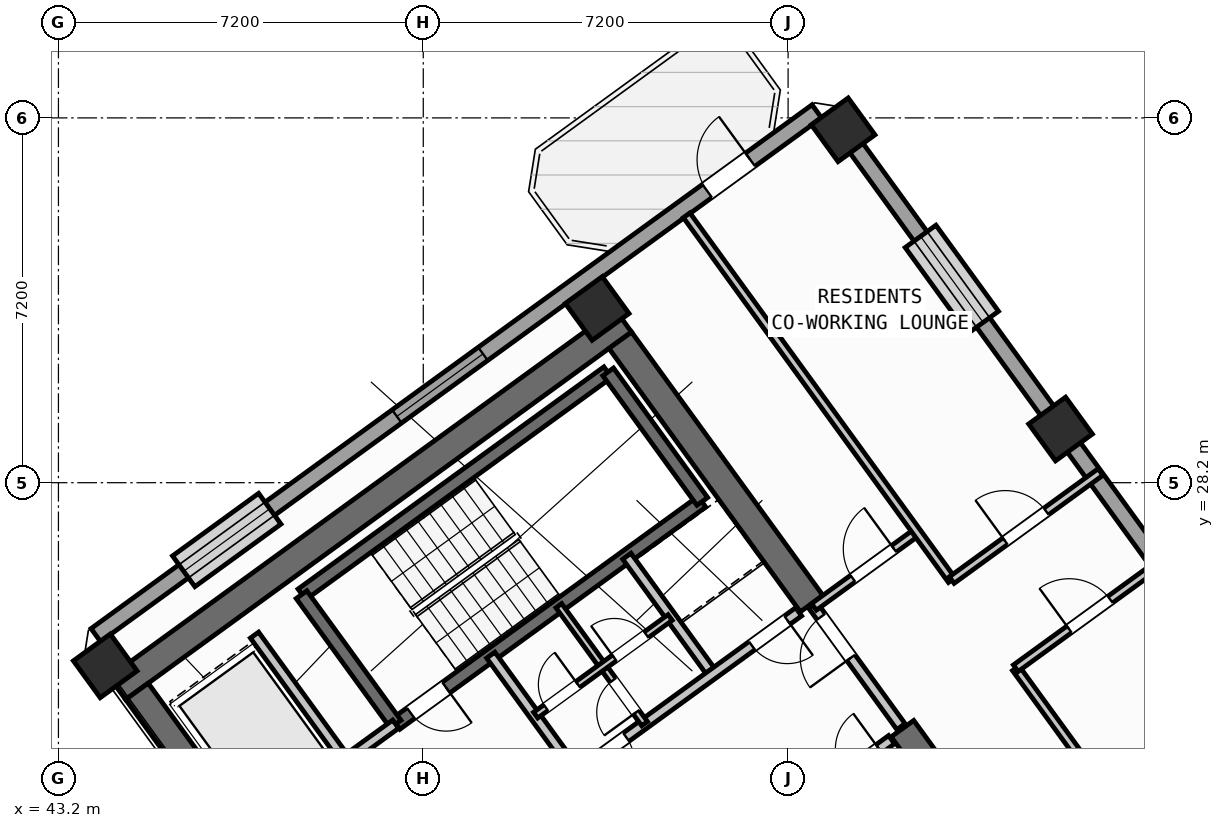
"""IFC4 building model, lengths in metres.
Left out: names, types, materials, properties, quantities, classifications, styles, units other than length and angle.
Written with IfcOpenShell. Run it as: python <this file> out.ifc"""

import sys

from ifc_helpers import new_model, si_unit, direction, frame, frame_2d, origin, origin_2d, place, context, subcontext, project, spatial, rectangle, hollow_rectangle, extrude, source, transform, mapped, element, fill, save


model = new_model("IFC4")
c1 = context("Model", 3, precision=1e-05, world=origin(), true_north=direction((0.0, 1.0)))
c2 = subcontext(c1, "Body", "Model", "MODEL_VIEW")
j1 = project(units=[si_unit("LENGTHUNIT", "METRE"), si_unit("PLANEANGLEUNIT", "RADIAN")], contexts=[c1])
p1 = place(None, origin())
s1 = spatial("IfcSite", under=j1, at=p1, CompositionType="ELEMENT")
p2 = place(p1, origin())
s2 = spatial("IfcBuilding", under=s1, at=p2, CompositionType="ELEMENT")
p3 = place(p2, frame((0.0, 0.0, 147.9)))
s3 = spatial("IfcBuildingStorey", under=s2, at=p3, CompositionType="ELEMENT", Elevation=147.9)
p4 = place(p3, frame((44.365, 24.142, 0.0), z_axis=(0.0, 0.0, 1.0), x_axis=(0.809024304885, 0.587775190107, 0.0)))
e1 = element("IfcWall", 1, at=p4, inside=s3, PredefinedType="SHEAR", context=c2, shape_type="SweptSolid", body=[
    extrude(rectangle(XDim=12.34, YDim=0.55, at=frame_2d((6.17, 0.0))), origin(), (0.0, 0.0, 1.0), 3.35),
])
p5 = place(p3, frame((48.526, 18.884, 0.0), z_axis=(0.0, 0.0, 1.0), x_axis=(-0.587764933797, 0.809031756236, 0.0)))
e2 = element("IfcWall", 2, at=p5, inside=s3, PredefinedType="SHEAR", context=c2, shape_type="SweptSolid", body=[
    extrude(rectangle(XDim=6.425, YDim=0.55, at=frame_2d((3.212, 0.0))), origin(), (0.0, 0.0, 1.0), 3.35),
])
p6 = place(p3, frame((61.958, 20.454, 0.0), z_axis=(0.0, 0.0, 1.0), x_axis=(-0.587802113096, 0.809004744015, 0.0)))
e3 = element("IfcWall", 3, at=p6, inside=s3, PredefinedType="SHEAR", context=c2, shape_type="SweptSolid", body=[
    extrude(rectangle(XDim=3.575, YDim=0.55, at=frame_2d((1.788, 0.0))), origin(), (0.0, 0.0, 1.0), 3.35),
])
p7 = place(p3, frame((58.064, 25.813, 0.0), z_axis=(0.0, 0.0, 1.0), x_axis=(-0.587764933797, 0.809031756236, 0.0)))
e4 = element("IfcWall", 4, at=p7, inside=s3, PredefinedType="SHEAR", context=c2, shape_type="SweptSolid", body=[
    extrude(rectangle(XDim=6.425, YDim=0.55, at=frame_2d((3.212, 0.0))), origin(), (0.0, 0.0, 1.0), 3.35),
])
m1 = source(origin(), c2, "Body", "SweptSolid", [
    extrude(hollow_rectangle(XDim=0.9, YDim=0.9, WallThickness=0.036, at=origin_2d()), origin(), (0.0, 0.0, 1.0), 3.6),
])
for number, where, z_axis, x_axis in (
    (5, (44.124, 24.585, 0.0), (0.0, 0.0, 1.0), (0.809, 0.588, 0.0)),
    (6, (53.832, 31.638, 0.0), (0.0, 0.0, 1.0), (0.809, 0.588, 0.0)),
    (7, (62.977, 29.259, 0.0), (0.0, 0.0, 1.0), (0.809, 0.588, 0.0)),
    (8, (58.686, 35.165, 0.0), (0.0, 0.0, 1.0), (0.809, 0.588, 0.0)),
):
    element("IfcColumn", number, at=place(p3, frame(where, z_axis=z_axis, x_axis=x_axis)), inside=s3, PredefinedType="COLUMN", context=c2, shape_type="MappedRepresentation", body=[
        mapped(m1, transform((0.0, 0.0, 0.0), scale=1.0)),
    ])
p8 = place(p3, frame((43.938, 25.192, 0.0), z_axis=(0.0, 0.0, 1.0), x_axis=(0.809016324578, 0.587786174187, 0.0)))
e9 = element("IfcWall", 9, at=p8, inside=s3, PredefinedType="STANDARD", context=c2, shape_type="SweptSolid", body=[
    extrude(rectangle(XDim=17.587, YDim=0.32, at=frame_2d((8.794, 0.0))), origin(), (0.0, 0.0, 1.0), 3.35),
])
p9 = place(p8, frame((14.914, 0.0, 0.0)))
e10 = element("IfcOpeningElement", 10, at=p9, cuts=e9, PredefinedType="OPENING", context=c2, shape_type="SweptSolid", body=[
    extrude(rectangle(XDim=1.05, YDim=2.15, at=frame_2d((0.525, 1.075))), frame((0.0, 0.17, 0.0), z_axis=(0.0, -1.0, 0.0), x_axis=(1.0, 0.0, 0.0)), (0.0, 0.0, 1.0), 0.34),
])
p10 = place(p8, frame((2.144, 0.0, 0.8)))
e11 = element("IfcOpeningElement", 11, at=p10, cuts=e9, PredefinedType="OPENING", context=c2, shape_type="SweptSolid", body=[
    extrude(rectangle(XDim=2.1, YDim=1.55, at=frame_2d((1.05, 0.775))), frame((0.0, 0.17, 0.0), z_axis=(0.0, -1.0, 0.0), x_axis=(1.0, 0.0, 0.0)), (0.0, 0.0, 1.0), 0.34),
])
p11 = place(p8, frame((7.344, 0.0, 0.8)))
e12 = element("IfcOpeningElement", 12, at=p11, cuts=e9, PredefinedType="OPENING", context=c2, shape_type="SweptSolid", body=[
    extrude(rectangle(XDim=2.1, YDim=1.55, at=frame_2d((1.05, 0.775))), frame((0.0, 0.17, 0.0), z_axis=(0.0, -1.0, 0.0), x_axis=(1.0, 0.0, 0.0)), (0.0, 0.0, 1.0), 0.34),
])
p12 = place(p3, frame((58.455, 35.484, 0.0), z_axis=(0.0, 0.0, 1.0), x_axis=(0.587783625747, -0.809018176127, 0.0)))
e13 = element("IfcWall", 13, at=p12, inside=s3, PredefinedType="STANDARD", context=c2, shape_type="SweptSolid", body=[
    extrude(rectangle(XDim=21.587, YDim=0.32, at=frame_2d((10.794, 0.0))), origin(), (0.0, 0.0, 1.0), 2.775),
])
p13 = place(p12, frame((2.994, 0.0, 0.8)))
e14 = element("IfcOpeningElement", 14, at=p13, cuts=e13, PredefinedType="OPENING", context=c2, shape_type="SweptSolid", body=[
    extrude(rectangle(XDim=2.1, YDim=1.55, at=frame_2d((1.05, 0.775))), frame((0.0, 0.17, 0.0), z_axis=(0.0, -1.0, 0.0), x_axis=(1.0, 0.0, 0.0)), (0.0, 0.0, 1.0), 0.34),
])
p14 = place(p12, frame((11.959, 0.0, 0.85)))
e15 = element("IfcOpeningElement", 15, at=p14, cuts=e13, PredefinedType="OPENING", context=c2, shape_type="SweptSolid", body=[
    extrude(rectangle(XDim=1.8, YDim=1.5, at=frame_2d((0.9, 0.75))), frame((0.0, 0.17, 0.0), z_axis=(0.0, -1.0, 0.0), x_axis=(1.0, 0.0, 0.0)), (0.0, 0.0, 1.0), 0.34),
])
p15 = place(p12, frame((18.56, 0.0, 0.85)))
e16 = element("IfcOpeningElement", 16, at=p15, cuts=e13, PredefinedType="OPENING", context=c2, shape_type="SweptSolid", body=[
    extrude(rectangle(XDim=1.5, YDim=1.5, at=frame_2d((0.75, 0.75))), frame((0.0, 0.17, 0.0), z_axis=(0.0, -1.0, 0.0), x_axis=(1.0, 0.0, 0.0)), (0.0, 0.0, 1.0), 0.34),
])
p16 = place(p3, frame((48.006, 25.996, 0.0), z_axis=(0.0, 0.0, 1.0), x_axis=(0.80901903764, 0.587782439969, 0.0)))
e17 = element("IfcWall", 17, at=p16, inside=s3, PredefinedType="SHEAR", context=c2, shape_type="SweptSolid", body=[
    extrude(rectangle(XDim=7.46, YDim=0.26, at=frame_2d((3.73, 0.0))), origin(), (0.0, 0.0, 1.0), 3.35),
])
p17 = place(p3, frame((49.863, 23.44, 0.0), z_axis=(0.0, 0.0, 1.0), x_axis=(0.809003474932, 0.587803859759, 0.0)))
e18 = element("IfcWall", 18, at=p17, inside=s3, PredefinedType="SHEAR", context=c2, shape_type="SweptSolid", body=[
    extrude(rectangle(XDim=7.46, YDim=0.26, at=frame_2d((3.73, 0.0))), origin(), (0.0, 0.0, 1.0), 3.35),
])
p18 = place(p17, frame((0.36, 0.0, 0.0)))
e19 = element("IfcOpeningElement", 19, at=p18, cuts=e18, PredefinedType="OPENING", context=c2, shape_type="SweptSolid", body=[
    extrude(rectangle(XDim=0.86, YDim=2.05, at=frame_2d((0.43, 1.025))), frame((0.0, 0.14, 0.0), z_axis=(0.0, -1.0, 0.0), x_axis=(1.0, 0.0, 0.0)), (0.0, 0.0, 1.0), 0.28),
])
p19 = place(p3, frame((49.855, 23.434, 0.0), z_axis=(0.0, 0.0, 1.0), x_axis=(-0.58776738483, 0.809029975545, 0.0)))
e20 = element("IfcWall", 20, at=p19, inside=s3, PredefinedType="SHEAR", context=c2, shape_type="SweptSolid", body=[
    extrude(rectangle(XDim=3.16, YDim=0.26, at=frame_2d((1.58, 0.0))), origin(), (0.0, 0.0, 1.0), 3.35),
])
p20 = place(p3, frame((55.906, 27.831, 0.0), z_axis=(0.0, 0.0, 1.0), x_axis=(-0.587804123638, 0.809003283204, 0.0)))
e21 = element("IfcWall", 21, at=p20, inside=s3, PredefinedType="SHEAR", context=c2, shape_type="SweptSolid", body=[
    extrude(rectangle(XDim=3.16, YDim=0.26, at=frame_2d((1.58, 0.0))), origin(), (0.0, 0.0, 1.0), 3.35),
])
p21 = place(p3, frame((47.065, 21.407, 0.0), z_axis=(0.0, 0.0, 1.0), x_axis=(0.809032984992, 0.587763242466, 0.0)))
e22 = element("IfcWall", 22, at=p21, inside=s3, PredefinedType="STANDARD", context=c2, shape_type="SweptSolid", body=[
    extrude(rectangle(XDim=3.448, YDim=0.2, at=frame_2d((1.724, 0.0))), origin(), (0.0, 0.0, 1.0), 3.34),
])
p22 = place(p21, frame((0.458, 0.0, 0.0)))
e23 = element("IfcOpeningElement", 23, at=p22, cuts=e22, PredefinedType="OPENING", context=c2, shape_type="SweptSolid", body=[
    extrude(rectangle(XDim=1.3, YDim=2.2, at=frame_2d((0.65, 1.1))), frame((0.0, 0.11, 0.0), z_axis=(0.0, -1.0, 0.0), x_axis=(1.0, 0.0, 0.0)), (0.0, 0.0, 1.0), 0.22),
])
p23 = place(p3, frame((56.553, 20.884, 0.0), z_axis=(0.0, 0.0, 1.0), x_axis=(0.809023564264, 0.58777620951, 0.0)))
e24 = element("IfcWall", 24, at=p23, inside=s3, PredefinedType="STANDARD", context=c2, shape_type="SweptSolid", body=[
    extrude(rectangle(XDim=3.818, YDim=0.2, at=frame_2d((1.909, 0.0))), origin(), (0.0, 0.0, 1.0), 3.34),
])
p24 = place(p23, frame((0.57, 0.0, 0.0)))
e25 = element("IfcOpeningElement", 25, at=p24, cuts=e24, PredefinedType="OPENING", context=c2, shape_type="SweptSolid", body=[
    extrude(rectangle(XDim=1.1, YDim=2.15, at=frame_2d((0.55, 1.075))), frame((0.0, 0.11, 0.0), z_axis=(0.0, -1.0, 0.0), x_axis=(1.0, 0.0, 0.0)), (0.0, 0.0, 1.0), 0.22),
])
p25 = place(p23, frame((2.65, 0.0, 0.0)))
e26 = element("IfcOpeningElement", 26, at=p25, cuts=e24, PredefinedType="OPENING", context=c2, shape_type="SweptSolid", body=[
    extrude(rectangle(XDim=0.86, YDim=2.05, at=frame_2d((0.43, 1.025))), frame((0.0, 0.11, 0.0), z_axis=(0.0, -1.0, 0.0), x_axis=(1.0, 0.0, 0.0)), (0.0, 0.0, 1.0), 0.22),
])
p26 = place(p3, frame((48.786, 22.83, 0.0), z_axis=(0.0, 0.0, 1.0), x_axis=(-0.587783856777, 0.809018008275, 0.0)))
e27 = element("IfcWall", 27, at=p26, inside=s3, PredefinedType="STANDARD", context=c2, shape_type="SweptSolid", body=[
    extrude(rectangle(XDim=2.92, YDim=0.2, at=frame_2d((1.46, 0.0))), origin(), (0.0, 0.0, 1.0), 3.34),
])
p27 = place(p3, frame((53.425, 22.468, 0.0), z_axis=(0.0, 0.0, 1.0), x_axis=(-0.5877230039, 0.809062216821, 0.0)))
e28 = element("IfcWall", 28, at=p27, inside=s3, PredefinedType="STANDARD", context=c2, shape_type="SweptSolid", body=[
    extrude(rectangle(XDim=2.88, YDim=0.2, at=frame_2d((1.44, 0.0))), origin(), (0.0, 0.0, 1.0), 3.34),
])
p28 = place(p3, frame((56.111, 24.419, 0.0), z_axis=(0.0, 0.0, 1.0), x_axis=(-0.58777848983, 0.809021907548, 0.0)))
e29 = element("IfcWall", 29, at=p28, inside=s3, PredefinedType="STANDARD", context=c2, shape_type="SweptSolid", body=[
    extrude(rectangle(XDim=2.88, YDim=0.2, at=frame_2d((1.44, 0.0))), origin(), (0.0, 0.0, 1.0), 3.34),
])
p29 = place(p3, frame((53.425, 22.468, 0.0), z_axis=(0.0, 0.0, 1.0), x_axis=(0.809024377198, 0.587775090574, 0.0)))
e30 = element("IfcWall", 30, at=p29, inside=s3, PredefinedType="STANDARD", context=c2, shape_type="SweptSolid", body=[
    extrude(rectangle(XDim=5.418, YDim=0.2, at=frame_2d((2.709, 0.0))), origin(), (0.0, 0.0, 1.0), 3.34),
])
p30 = place(p29, frame((4.28, 0.0, 0.0)))
e31 = element("IfcOpeningElement", 31, at=p30, cuts=e30, PredefinedType="OPENING", context=c2, shape_type="SweptSolid", body=[
    extrude(rectangle(XDim=0.86, YDim=2.05, at=frame_2d((0.43, 1.025))), frame((0.0, 0.11, 0.0), z_axis=(0.0, -1.0, 0.0), x_axis=(1.0, 0.0, 0.0)), (0.0, 0.0, 1.0), 0.22),
])
p31 = place(p29, frame((0.35, 0.0, 0.0)))
e32 = element("IfcOpeningElement", 32, at=p31, cuts=e30, PredefinedType="OPENING", context=c2, shape_type="SweptSolid", body=[
    extrude(rectangle(XDim=0.86, YDim=2.05, at=frame_2d((0.43, 1.025))), frame((0.0, 0.11, 0.0), z_axis=(0.0, -1.0, 0.0), x_axis=(1.0, 0.0, 0.0)), (0.0, 0.0, 1.0), 0.22),
])
p32 = place(p3, frame((54.768, 23.443, 0.0), z_axis=(0.0, 0.0, 1.0), x_axis=(-0.587736077749, 0.809052719489, 0.0)))
e33 = element("IfcWall", 33, at=p32, inside=s3, PredefinedType="PLUMBINGWALL", context=c2, shape_type="SweptSolid", body=[
    extrude(rectangle(XDim=1.4, YDim=0.14, at=frame_2d((0.7, 0.0))), origin(), (0.0, 0.0, 1.0), 3.34),
])
p33 = place(p32, frame((0.28, 0.0, 0.0)))
e34 = element("IfcOpeningElement", 34, at=p33, cuts=e33, PredefinedType="OPENING", context=c2, shape_type="SweptSolid", body=[
    extrude(rectangle(XDim=0.78, YDim=2.05, at=frame_2d((0.39, 1.025))), frame((0.0, 0.08, 0.0), z_axis=(0.0, -1.0, 0.0), x_axis=(1.0, 0.0, 0.0)), (0.0, 0.0, 1.0), 0.16),
])
p34 = place(p3, frame((53.945, 24.576, 0.0), z_axis=(0.0, 0.0, 1.0), x_axis=(-0.587897037186, 0.808935766095, 0.0)))
e35 = element("IfcWall", 35, at=p34, inside=s3, PredefinedType="PLUMBINGWALL", context=c2, shape_type="SweptSolid", body=[
    extrude(rectangle(XDim=1.48, YDim=0.14, at=frame_2d((0.74, 0.0))), origin(), (0.0, 0.0, 1.0), 3.34),
])
p35 = place(p3, frame((52.618, 23.612, 0.0), z_axis=(0.0, 0.0, 1.0), x_axis=(0.809009587469, 0.587795446889, 0.0)))
e36 = element("IfcWall", 36, at=p35, inside=s3, PredefinedType="PLUMBINGWALL", context=c2, shape_type="SweptSolid", body=[
    extrude(rectangle(XDim=3.28, YDim=0.14, at=frame_2d((1.64, 0.0))), origin(), (0.0, 0.0, 1.0), 3.34),
])
p36 = place(p35, frame((0.25, 0.0, 0.0)))
e37 = element("IfcOpeningElement", 37, at=p36, cuts=e36, PredefinedType="OPENING", context=c2, shape_type="SweptSolid", body=[
    extrude(rectangle(XDim=0.78, YDim=2.05, at=frame_2d((0.39, 1.025))), frame((0.0, 0.08, 0.0), z_axis=(0.0, -1.0, 0.0), x_axis=(1.0, 0.0, 0.0)), (0.0, 0.0, 1.0), 0.16),
])
p37 = place(p35, frame((1.92, 0.0, 0.0)))
e38 = element("IfcOpeningElement", 38, at=p37, cuts=e36, PredefinedType="OPENING", context=c2, shape_type="SweptSolid", body=[
    extrude(rectangle(XDim=0.78, YDim=2.05, at=frame_2d((0.39, 1.025))), frame((0.0, 0.08, 0.0), z_axis=(0.0, -1.0, 0.0), x_axis=(1.0, 0.0, 0.0)), (0.0, 0.0, 1.0), 0.16),
])
p38 = place(p3, frame((59.827, 23.386, 0.0), z_axis=(0.0, 0.0, 1.0), x_axis=(-0.587803840107, 0.809003489211, 0.0)))
e39 = element("IfcWall", 39, at=p38, inside=s3, PredefinedType="STANDARD", context=c2, shape_type="SweptSolid", body=[
    extrude(rectangle(XDim=2.96, YDim=0.2, at=frame_2d((1.48, 0.0))), origin(), (0.0, 0.0, 1.0), 3.34),
])
p39 = place(p38, frame((1.68, 0.0, 0.0)))
e40 = element("IfcOpeningElement", 40, at=p39, cuts=e39, PredefinedType="OPENING", context=c2, shape_type="SweptSolid", body=[
    extrude(rectangle(XDim=1.0, YDim=2.1, at=frame_2d((0.5, 1.05))), frame((0.0, 0.11, 0.0), z_axis=(0.0, -1.0, 0.0), x_axis=(1.0, 0.0, 0.0)), (0.0, 0.0, 1.0), 0.22),
])
p40 = place(p3, frame((58.111, 25.749, 0.0), z_axis=(0.0, 0.0, 1.0), x_axis=(0.809000999347, 0.58780726693, 0.0)))
e41 = element("IfcWall", 41, at=p40, inside=s3, PredefinedType="PARTITIONING", context=c2, shape_type="SweptSolid", body=[
    extrude(rectangle(XDim=2.51, YDim=0.16, at=frame_2d((1.255, 0.0))), origin(), (0.0, 0.0, 1.0), 2.775),
])
p41 = place(p40, frame((0.95, 0.0, 0.0)))
e42 = element("IfcOpeningElement", 42, at=p41, cuts=e41, PredefinedType="OPENING", context=c2, shape_type="SweptSolid", body=[
    extrude(rectangle(XDim=1.0, YDim=2.1, at=frame_2d((0.5, 1.05))), frame((0.0, 0.09, 0.0), z_axis=(0.0, -1.0, 0.0), x_axis=(1.0, 0.0, 0.0)), (0.0, 0.0, 1.0), 0.18),
])
p42 = place(p3, frame((68.353, 15.922, 0.0), z_axis=(0.0, 0.0, 1.0), x_axis=(-0.587783168305, 0.809018508476, 0.0)))
e43 = element("IfcWall", 43, at=p42, inside=s3, PredefinedType="PARTITIONING", context=c2, shape_type="SweptSolid", body=[
    extrude(rectangle(XDim=10.65, YDim=0.16, at=frame_2d((5.325, 0.0))), origin(), (0.0, 0.0, 1.0), 3.34),
])
p43 = place(p3, frame((60.829, 26.278, 0.0), z_axis=(0.0, 0.0, 1.0), x_axis=(-0.587781800813, 0.80901950201, 0.0)))
e44 = element("IfcWall", 44, at=p43, inside=s3, PredefinedType="PARTITIONING", context=c2, shape_type="SweptSolid", body=[
    extrude(rectangle(XDim=8.9, YDim=0.16, at=frame_2d((4.45, 0.0))), origin(), (0.0, 0.0, 1.0), 3.34),
])
p44 = place(p3, frame((62.093, 24.538, 0.0), z_axis=(0.0, 0.0, 1.0), x_axis=(0.809035546126, 0.58775971715, 0.0)))
e45 = element("IfcWall", 45, at=p44, inside=s3, PredefinedType="PARTITIONING", context=c2, shape_type="SweptSolid", body=[
    extrude(rectangle(XDim=3.63, YDim=0.16, at=frame_2d((1.815, 0.0))), origin(), (0.0, 0.0, 1.0), 3.34),
])
p45 = place(p44, frame((1.305, 0.0, 0.0)))
e46 = element("IfcOpeningElement", 46, at=p45, cuts=e45, PredefinedType="OPENING", context=c2, shape_type="SweptSolid", body=[
    extrude(rectangle(XDim=1.0, YDim=2.1, at=frame_2d((0.5, 1.05))), frame((0.0, 0.09, 0.0), z_axis=(0.0, -1.0, 0.0), x_axis=(1.0, 0.0, 0.0)), (0.0, 0.0, 1.0), 0.18),
])
p46 = place(p3, frame((60.829, 26.278, 0.0), z_axis=(0.0, 0.0, 1.0), x_axis=(0.809003564202, 0.587803736896, 0.0)))
e47 = element("IfcWall", 47, at=p46, inside=s3, PredefinedType="PARTITIONING", context=c2, shape_type="SweptSolid", body=[
    extrude(rectangle(XDim=3.63, YDim=0.16, at=frame_2d((1.815, 0.0))), origin(), (0.0, 0.0, 1.0), 3.34),
])
p47 = place(p46, frame((1.305, 0.0, 0.0)))
e48 = element("IfcOpeningElement", 48, at=p47, cuts=e47, PredefinedType="OPENING", context=c2, shape_type="SweptSolid", body=[
    extrude(rectangle(XDim=1.0, YDim=2.1, at=frame_2d((0.5, 1.05))), frame((0.0, 0.09, 0.0), z_axis=(0.0, -1.0, 0.0), x_axis=(1.0, 0.0, 0.0)), (0.0, 0.0, 1.0), 0.18),
])
m2 = source(origin(), c2, "Body", "SweptSolid", [
    extrude(rectangle(XDim=1.05, YDim=2.15, at=frame_2d((0.525, 1.075))), frame((0.0, 0.025, 0.0), z_axis=(0.0, -1.0, 0.0), x_axis=(1.0, 0.0, 0.0)), (0.0, 0.0, 1.0), 0.05),
])
p48 = place(p9, origin())
e49 = element("IfcDoor", 49, at=p48, inside=s3, OperationType="SINGLE_SWING_RIGHT", PredefinedType="DOOR", context=c2, shape_type="MappedRepresentation", body=[
    mapped(m2, transform((0.0, 0.0, 0.0), scale=1.0)),
])
fill(e10, e49)
m3 = source(origin(), c2, "Body", "SweptSolid", [
    extrude(rectangle(XDim=2.1, YDim=1.55, at=frame_2d((1.05, 0.775))), frame((0.0, 0.03, 0.0), z_axis=(0.0, -1.0, 0.0), x_axis=(1.0, 0.0, 0.0)), (0.0, 0.0, 1.0), 0.06),
])
p49 = place(p10, origin())
e50 = element("IfcWindow", 50, at=p49, inside=s3, PartitioningType="SINGLE_PANEL", PredefinedType="WINDOW", context=c2, shape_type="MappedRepresentation", body=[
    mapped(m3, transform((0.0, 0.0, 0.0), scale=1.0)),
])
fill(e11, e50)
p50 = place(p11, origin())
e51 = element("IfcWindow", 51, at=p50, inside=s3, PartitioningType="SINGLE_PANEL", PredefinedType="WINDOW", context=c2, shape_type="MappedRepresentation", body=[
    mapped(m3, transform((0.0, 0.0, 0.0), scale=1.0)),
])
fill(e12, e51)
p51 = place(p13, origin())
e52 = element("IfcWindow", 52, at=p51, inside=s3, PartitioningType="SINGLE_PANEL", PredefinedType="WINDOW", context=c2, shape_type="MappedRepresentation", body=[
    mapped(m3, transform((0.0, 0.0, 0.0), scale=1.0)),
])
fill(e14, e52)
m4 = source(origin(), c2, "Body", "SweptSolid", [
    extrude(rectangle(XDim=0.86, YDim=2.05, at=frame_2d((0.43, 1.025))), frame((0.0, 0.025, 0.0), z_axis=(0.0, -1.0, 0.0), x_axis=(1.0, 0.0, 0.0)), (0.0, 0.0, 1.0), 0.05),
])
p52 = place(p18, frame((0.86, 0.0, 0.0), z_axis=(0.0, 0.0, 1.0), x_axis=(-1.0, 0.0, 0.0)))
e53 = element("IfcDoor", 53, at=p52, inside=s3, OperationType="SINGLE_SWING_LEFT", PredefinedType="DOOR", context=c2, shape_type="MappedRepresentation", body=[
    mapped(m4, transform((0.0, 0.0, 0.0), scale=1.0)),
])
fill(e19, e53)
p53 = place(p30, frame((0.86, 0.0, 0.0), z_axis=(0.0, 0.0, 1.0), x_axis=(-1.0, 0.0, 0.0)))
e54 = element("IfcDoor", 54, at=p53, inside=s3, OperationType="SINGLE_SWING_LEFT", PredefinedType="DOOR", context=c2, shape_type="MappedRepresentation", body=[
    mapped(m4, transform((0.0, 0.0, 0.0), scale=1.0)),
])
fill(e31, e54)
p54 = place(p31, frame((0.86, 0.0, 0.0), z_axis=(0.0, 0.0, 1.0), x_axis=(-1.0, 0.0, 0.0)))
e55 = element("IfcDoor", 55, at=p54, inside=s3, OperationType="SINGLE_SWING_RIGHT", PredefinedType="DOOR", context=c2, shape_type="MappedRepresentation", body=[
    mapped(m4, transform((0.0, 0.0, 0.0), scale=1.0)),
])
fill(e32, e55)
m5 = source(origin(), c2, "Body", "SweptSolid", [
    extrude(rectangle(XDim=0.78, YDim=2.05, at=frame_2d((0.39, 1.025))), frame((0.0, 0.025, 0.0), z_axis=(0.0, -1.0, 0.0), x_axis=(1.0, 0.0, 0.0)), (0.0, 0.0, 1.0), 0.05),
])
p55 = place(p33, origin())
e56 = element("IfcDoor", 56, at=p55, inside=s3, OperationType="SINGLE_SWING_LEFT", PredefinedType="DOOR", context=c2, shape_type="MappedRepresentation", body=[
    mapped(m5, transform((0.0, 0.0, 0.0), scale=1.0)),
])
fill(e34, e56)
p56 = place(p36, origin())
e57 = element("IfcDoor", 57, at=p56, inside=s3, OperationType="SINGLE_SWING_RIGHT", PredefinedType="DOOR", context=c2, shape_type="MappedRepresentation", body=[
    mapped(m5, transform((0.0, 0.0, 0.0), scale=1.0)),
])
fill(e37, e57)
p57 = place(p37, origin())
e58 = element("IfcDoor", 58, at=p57, inside=s3, OperationType="SINGLE_SWING_LEFT", PredefinedType="DOOR", context=c2, shape_type="MappedRepresentation", body=[
    mapped(m5, transform((0.0, 0.0, 0.0), scale=1.0)),
])
fill(e38, e58)
m6 = source(origin(), c2, "Body", "SweptSolid", [
    extrude(rectangle(XDim=1.0, YDim=2.1, at=frame_2d((0.5, 1.05))), frame((0.0, 0.025, 0.0), z_axis=(0.0, -1.0, 0.0), x_axis=(1.0, 0.0, 0.0)), (0.0, 0.0, 1.0), 0.05),
])
p58 = place(p41, origin())
e59 = element("IfcDoor", 59, at=p58, inside=s3, OperationType="SINGLE_SWING_RIGHT", PredefinedType="DOOR", context=c2, shape_type="MappedRepresentation", body=[
    mapped(m6, transform((0.0, 0.0, 0.0), scale=1.0)),
])
fill(e42, e59)
p59 = place(p39, origin())
e60 = element("IfcDoor", 60, at=p59, inside=s3, OperationType="SINGLE_SWING_LEFT", PredefinedType="DOOR", context=c2, shape_type="MappedRepresentation", body=[
    mapped(m6, transform((0.0, 0.0, 0.0), scale=1.0)),
])
fill(e40, e60)
p60 = place(p47, origin())
e61 = element("IfcDoor", 61, at=p60, inside=s3, OperationType="SINGLE_SWING_LEFT", PredefinedType="DOOR", context=c2, shape_type="MappedRepresentation", body=[
    mapped(m6, transform((0.0, 0.0, 0.0), scale=1.0)),
])
fill(e48, e61)
p61 = place(p45, origin())
e62 = element("IfcDoor", 62, at=p61, inside=s3, OperationType="SINGLE_SWING_LEFT", PredefinedType="DOOR", context=c2, shape_type="MappedRepresentation", body=[
    mapped(m6, transform((0.0, 0.0, 0.0), scale=1.0)),
])
fill(e46, e62)
save(model, sys.argv[1])
